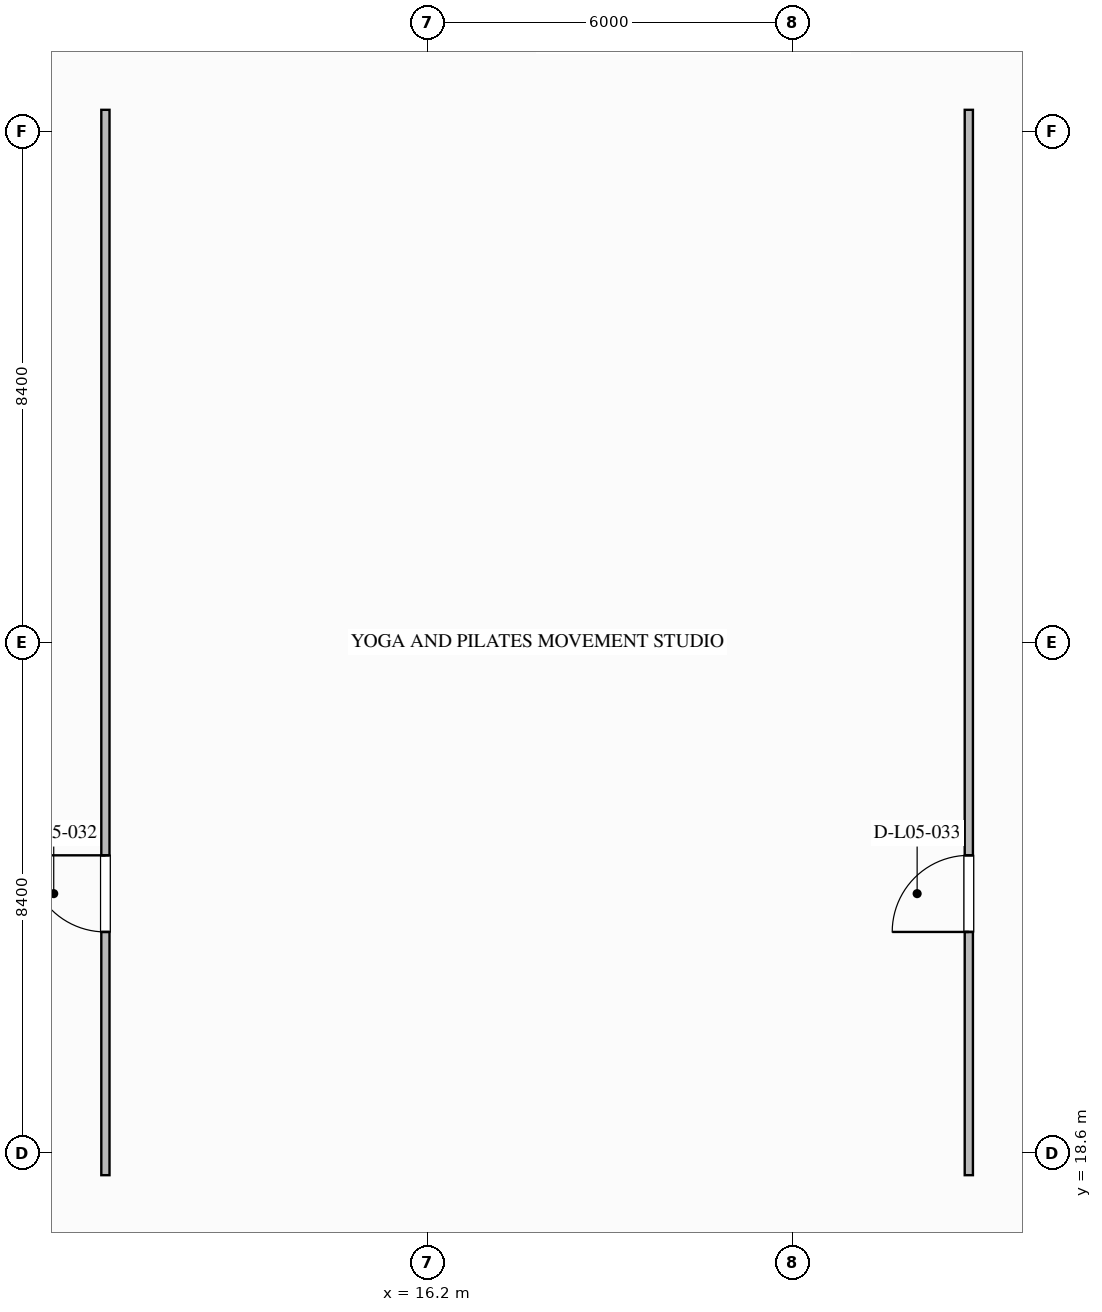
"""IFC4 building model, lengths in metres.
Left out: names, types, materials, properties, quantities, classifications, styles, units other than length and angle.
Written with IfcOpenShell. Run it as: python <this file> out.ifc"""

import sys

from ifc_helpers import new_model, si_unit, direction, frame, frame_2d, origin, place, context, subcontext, project, spatial, rectangle, extrude, element, fill, save


model = new_model("IFC4")
c1 = context("Model", 3, precision=1e-05, world=origin(), true_north=direction((0.0, 1.0)))
c2 = subcontext(c1, "Body", "Model", "MODEL_VIEW")
j1 = project(units=[si_unit("LENGTHUNIT", "METRE"), si_unit("PLANEANGLEUNIT", "RADIAN")], contexts=[c1])
p1 = place(None, origin())
s1 = spatial("IfcSite", under=j1, at=p1, CompositionType="ELEMENT")
p2 = place(p1, origin())
s2 = spatial("IfcBuilding", under=s1, at=p2, CompositionType="ELEMENT")
p3 = place(p2, frame((0.0, 0.0, 27.6)))
s3 = spatial("IfcBuildingStorey", under=s2, at=p3, CompositionType="ELEMENT", Elevation=27.6)
p4 = place(p3, frame((10.9, 18.24, 0.0), z_axis=(0.0, 0.0, 1.0), x_axis=(0.0, 1.0, 0.0)))
e1 = element("IfcWall", 1, at=p4, inside=s3, PredefinedType="PARTITIONING", context=c2, shape_type="SweptSolid", body=[
    extrude(rectangle(XDim=17.52, YDim=0.135, at=frame_2d((8.76, 0.0))), origin(), (0.0, 0.0, 1.0), 5.32),
])
p5 = place(p4, frame((4.0, 0.0, 0.0)))
e2 = element("IfcOpeningElement", 2, at=p5, cuts=e1, PredefinedType="OPENING", context=c2, shape_type="SweptSolid", body=[
    extrude(rectangle(XDim=1.26, YDim=2.2, at=frame_2d((0.63, 1.1))), frame((0.0, 0.077, 0.0), z_axis=(0.0, -1.0, 0.0), x_axis=(1.0, 0.0, 0.0)), (0.0, 0.0, 1.0), 0.155),
])
p6 = place(p3, frame((25.1, 18.24, 0.0), z_axis=(0.0, 0.0, 1.0), x_axis=(0.0, 1.0, 0.0)))
e3 = element("IfcWall", 3, at=p6, inside=s3, PredefinedType="PARTITIONING", context=c2, shape_type="SweptSolid", body=[
    extrude(rectangle(XDim=17.52, YDim=0.135, at=frame_2d((8.76, 0.0))), origin(), (0.0, 0.0, 1.0), 5.32),
])
p7 = place(p6, frame((4.0, 0.0, 0.0)))
e4 = element("IfcOpeningElement", 4, at=p7, cuts=e3, PredefinedType="OPENING", context=c2, shape_type="SweptSolid", body=[
    extrude(rectangle(XDim=1.26, YDim=2.2, at=frame_2d((0.63, 1.1))), frame((0.0, 0.077, 0.0), z_axis=(0.0, -1.0, 0.0), x_axis=(1.0, 0.0, 0.0)), (0.0, 0.0, 1.0), 0.155),
])
p8 = place(p5, origin())
e5 = element("IfcDoor", 5, at=p8, inside=s3, OperationType="SINGLE_SWING_RIGHT", PredefinedType="DOOR", context=c2, shape_type="SweptSolid", body=[
    extrude(rectangle(XDim=1.26, YDim=2.2, at=frame_2d((0.63, 1.1))), frame((0.0, 0.025, 0.0), z_axis=(0.0, -1.0, 0.0), x_axis=(1.0, 0.0, 0.0)), (0.0, 0.0, 1.0), 0.05),
])
fill(e2, e5)
p9 = place(p7, origin())
e6 = element("IfcDoor", 6, at=p9, inside=s3, OperationType="SINGLE_SWING_LEFT", PredefinedType="DOOR", context=c2, shape_type="SweptSolid", body=[
    extrude(rectangle(XDim=1.26, YDim=2.2, at=frame_2d((0.63, 1.1))), frame((0.0, 0.025, 0.0), z_axis=(0.0, -1.0, 0.0), x_axis=(1.0, 0.0, 0.0)), (0.0, 0.0, 1.0), 0.05),
])
fill(e4, e6)
save(model, sys.argv[1])
